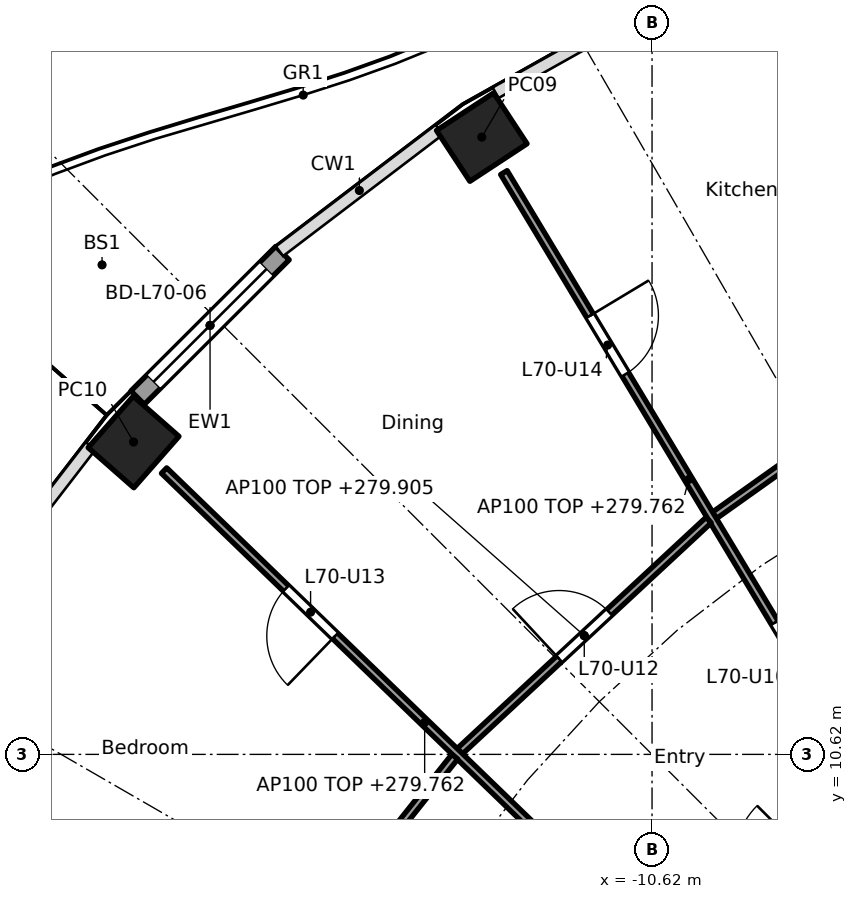
"""IFC4 building model, lengths in metres.
Left out: names, types, materials, properties, quantities, classifications, styles, units other than length and angle.
Written with IfcOpenShell. Run it as: python <this file> out.ifc"""

import sys

from ifc_helpers import new_model, si_unit, direction, frame, frame_2d, origin, origin_2d, place, context, subcontext, project, spatial, rectangle, hollow_rectangle, extrude, element, fill, save


model = new_model("IFC4")
c1 = context("Model", 3, precision=1e-05, world=origin(), true_north=direction((0.0, 1.0)))
c2 = subcontext(c1, "Body", "Model", "MODEL_VIEW")
j1 = project(units=[si_unit("LENGTHUNIT", "METRE"), si_unit("PLANEANGLEUNIT", "RADIAN")], contexts=[c1])
p1 = place(None, origin())
s1 = spatial("IfcSite", under=j1, at=p1, CompositionType="ELEMENT")
p2 = place(p1, origin())
s2 = spatial("IfcBuilding", under=s1, at=p2, CompositionType="ELEMENT")
p3 = place(p2, frame((0.0, 0.0, 277.0)))
s3 = spatial("IfcBuildingStorey", under=s2, at=p3, CompositionType="ELEMENT", Elevation=277.0)
for number, where, z_axis, x_axis in (
    (1, (-12.86, 18.741, 0.0), (0.0, 0.0, 1.0), (-0.836, -0.549, 0.0)),
    (2, (-17.441, 14.73, 0.0), (0.0, 0.0, 1.0), (-0.66, -0.751, 0.0)),
):
    element("IfcColumn", number, at=place(p3, frame(where, z_axis=z_axis, x_axis=x_axis)), inside=s3, PredefinedType="COLUMN", context=c2, shape_type="SweptSolid", body=[
        extrude(hollow_rectangle(XDim=0.9, YDim=0.8, WallThickness=0.028, at=origin_2d()), origin(), (0.0, 0.0, 1.0), 3.7),
    ])
p4 = place(p3, frame((-17.388, 15.313, 0.0), z_axis=(0.0, 0.0, 1.0), x_axis=(0.707831739508, 0.706381078841, 0.0)))
e3 = element("IfcWall", 3, at=p4, inside=s3, PredefinedType="SOLIDWALL", context=c2, shape_type="SweptSolid", body=[
    extrude(rectangle(XDim=2.693, YDim=0.25, at=frame_2d((1.346, 0.0))), origin(), (0.0, 0.0, 1.0), 3.44),
])
p5 = place(p4, frame((0.296, 0.0, 0.0)))
e4 = element("IfcOpeningElement", 4, at=p5, cuts=e3, PredefinedType="OPENING", context=c2, shape_type="SweptSolid", body=[
    extrude(rectangle(XDim=2.1, YDim=2.4, at=frame_2d((1.05, 1.2))), frame((0.0, 0.135, 0.0), z_axis=(0.0, -1.0, 0.0), x_axis=(1.0, 0.0, 0.0)), (0.0, 0.0, 1.0), 0.27),
])
p6 = place(p3, frame((-4.613, 9.988, 0.0), z_axis=(0.0, 0.0, 1.0), x_axis=(-0.707106781187, -0.707106781187, 0.0)))
e5 = element("IfcWall", 5, at=p6, inside=s3, PredefinedType="SHEAR", context=c2, shape_type="SweptSolid", body=[
    extrude(rectangle(XDim=7.602, YDim=0.6, at=frame_2d((3.801, 0.0))), origin(), (0.0, 0.0, 1.0), 3.44),
])
p7 = place(p6, frame((0.351, 0.0, 0.0)))
e6 = element("IfcOpeningElement", 6, at=p7, cuts=e5, PredefinedType="OPENING", context=c2, shape_type="SweptSolid", body=[
    extrude(rectangle(XDim=1.1, YDim=2.1, at=frame_2d((0.55, 1.05))), frame((0.0, 0.31, 0.0), z_axis=(0.0, -1.0, 0.0), x_axis=(1.0, 0.0, 0.0)), (0.0, 0.0, 1.0), 0.62),
])
p8 = place(p3, frame((-5.275, 12.494, 0.0), z_axis=(0.0, 0.0, 1.0), x_axis=(-0.707106781187, -0.707106781187, 0.0)))
e7 = element("IfcWall", 7, at=p8, inside=s3, PredefinedType="PARTITIONING", context=c2, shape_type="SweptSolid", body=[
    extrude(rectangle(XDim=10.209, YDim=0.2, at=frame_2d((5.104, 0.0))), origin(), (0.0, 0.0, 1.0), 3.44),
])
p9 = place(p8, frame((4.604, 0.0, 0.0)))
e8 = element("IfcOpeningElement", 8, at=p9, cuts=e7, PredefinedType="OPENING", context=c2, shape_type="SweptSolid", body=[
    extrude(rectangle(XDim=1.0, YDim=2.1, at=frame_2d((0.5, 1.05))), frame((0.0, 0.11, 0.0), z_axis=(0.0, -1.0, 0.0), x_axis=(1.0, 0.0, 0.0)), (0.0, 0.0, 1.0), 0.22),
])
p10 = place(p3, frame((-6.508, 16.103, 0.0), z_axis=(0.0, 0.0, 1.0), x_axis=(-0.815202203556, -0.579176456114, 0.0)))
e9 = element("IfcWall", 9, at=p10, inside=s3, PredefinedType="PARTITIONING", context=c2, shape_type="SweptSolid", body=[
    extrude(rectangle(XDim=4.036, YDim=0.1, at=frame_2d((2.018, 0.0))), origin(), (0.0, 0.0, 1.0), 2.905),
])
p11 = place(p3, frame((-7.709, 10.197, 0.0), z_axis=(0.0, 0.0, 1.0), x_axis=(-0.515516160663, 0.856879856278, 0.0)))
e10 = element("IfcWall", 10, at=p11, inside=s3, PredefinedType="PARTITIONING", context=c2, shape_type="SweptSolid", body=[
    extrude(rectangle(XDim=9.426, YDim=0.1, at=frame_2d((4.713, 0.0))), origin(), (0.0, 0.0, 1.0), 2.762),
])
p12 = place(p11, frame((1.615, 0.0, 0.0)))
e11 = element("IfcOpeningElement", 11, at=p12, cuts=e10, PredefinedType="OPENING", context=c2, shape_type="SweptSolid", body=[
    extrude(rectangle(XDim=0.9, YDim=2.1, at=frame_2d((0.45, 1.05))), frame((0.0, 0.06, 0.0), z_axis=(0.0, -1.0, 0.0), x_axis=(1.0, 0.0, 0.0)), (0.0, 0.0, 1.0), 0.12),
])
p13 = place(p11, frame((6.328, 0.0, 0.0)))
e12 = element("IfcOpeningElement", 12, at=p13, cuts=e10, PredefinedType="OPENING", context=c2, shape_type="SweptSolid", body=[
    extrude(rectangle(XDim=0.9, YDim=2.1, at=frame_2d((0.45, 1.05))), frame((0.0, 0.06, 0.0), z_axis=(0.0, -1.0, 0.0), x_axis=(1.0, 0.0, 0.0)), (0.0, 0.0, 1.0), 0.12),
])
p14 = place(p3, frame((-9.875, 13.702, 0.0), z_axis=(0.0, 0.0, 1.0), x_axis=(-0.732618266441, -0.680639754699, 0.0)))
e13 = element("IfcWall", 13, at=p14, inside=s3, PredefinedType="PARTITIONING", context=c2, shape_type="SweptSolid", body=[
    extrude(rectangle(XDim=4.467, YDim=0.1, at=frame_2d((2.233, 0.0))), origin(), (0.0, 0.0, 1.0), 2.905),
])
p15 = place(p14, frame((1.783, 0.0, 0.0)))
e14 = element("IfcOpeningElement", 14, at=p15, cuts=e13, PredefinedType="OPENING", context=c2, shape_type="SweptSolid", body=[
    extrude(rectangle(XDim=0.9, YDim=2.1, at=frame_2d((0.45, 1.05))), frame((0.0, 0.06, 0.0), z_axis=(0.0, -1.0, 0.0), x_axis=(1.0, 0.0, 0.0)), (0.0, 0.0, 1.0), 0.12),
])
p16 = place(p3, frame((-10.183, 7.727, 0.0), z_axis=(0.0, 0.0, 1.0), x_axis=(-0.719063433856, 0.694944442449, 0.0)))
e15 = element("IfcWall", 15, at=p16, inside=s3, PredefinedType="PARTITIONING", context=c2, shape_type="SweptSolid", body=[
    extrude(rectangle(XDim=9.535, YDim=0.1, at=frame_2d((4.768, 0.0))), origin(), (0.0, 0.0, 1.0), 2.762),
])
p17 = place(p16, frame((1.637, 0.0, 0.0)))
e16 = element("IfcOpeningElement", 16, at=p17, cuts=e15, PredefinedType="OPENING", context=c2, shape_type="SweptSolid", body=[
    extrude(rectangle(XDim=0.9, YDim=2.1, at=frame_2d((0.45, 1.05))), frame((0.0, 0.06, 0.0), z_axis=(0.0, -1.0, 0.0), x_axis=(1.0, 0.0, 0.0)), (0.0, 0.0, 1.0), 0.12),
])
p18 = place(p16, frame((6.405, 0.0, 0.0)))
e17 = element("IfcOpeningElement", 17, at=p18, cuts=e15, PredefinedType="OPENING", context=c2, shape_type="SweptSolid", body=[
    extrude(rectangle(XDim=0.9, YDim=2.1, at=frame_2d((0.45, 1.05))), frame((0.0, 0.06, 0.0), z_axis=(0.0, -1.0, 0.0), x_axis=(1.0, 0.0, 0.0)), (0.0, 0.0, 1.0), 0.12),
])
p19 = place(p3, frame((-13.216, 10.589, 0.0), z_axis=(0.0, 0.0, 1.0), x_axis=(-0.622251572882, -0.782817335045, 0.0)))
e18 = element("IfcWall", 18, at=p19, inside=s3, PredefinedType="PARTITIONING", context=c2, shape_type="SweptSolid", body=[
    extrude(rectangle(XDim=4.636, YDim=0.1, at=frame_2d((2.318, 0.0))), origin(), (0.0, 0.0, 1.0), 2.905),
])
p20 = place(p5, origin())
e19 = element("IfcDoor", 19, at=p20, inside=s3, OperationType="SLIDING_TO_LEFT", PredefinedType="DOOR", context=c2, shape_type="SweptSolid", body=[
    extrude(rectangle(XDim=2.1, YDim=2.4, at=frame_2d((1.05, 1.2))), frame((0.0, 0.025, 0.0), z_axis=(0.0, -1.0, 0.0), x_axis=(1.0, 0.0, 0.0)), (0.0, 0.0, 1.0), 0.05),
])
fill(e4, e19)
p21 = place(p12, frame((0.9, 0.0, 0.0), x_axis=(-1.0, 0.0, 0.0)))
e20 = element("IfcDoor", 20, at=p21, inside=s3, OperationType="SINGLE_SWING_LEFT", PredefinedType="DOOR", context=c2, shape_type="SweptSolid", body=[
    extrude(rectangle(XDim=0.9, YDim=2.1, at=frame_2d((0.45, 1.05))), frame((0.0, 0.025, 0.0), z_axis=(0.0, -1.0, 0.0), x_axis=(1.0, 0.0, 0.0)), (0.0, 0.0, 1.0), 0.05),
])
fill(e11, e20)
p22 = place(p15, frame((0.9, 0.0, 0.0), x_axis=(-1.0, 0.0, 0.0)))
e21 = element("IfcDoor", 21, at=p22, inside=s3, OperationType="SINGLE_SWING_LEFT", PredefinedType="DOOR", context=c2, shape_type="SweptSolid", body=[
    extrude(rectangle(XDim=0.9, YDim=2.1, at=frame_2d((0.45, 1.05))), frame((0.0, 0.025, 0.0), z_axis=(0.0, -1.0, 0.0), x_axis=(1.0, 0.0, 0.0)), (0.0, 0.0, 1.0), 0.05),
])
fill(e14, e21)
p23 = place(p18, origin())
e22 = element("IfcDoor", 22, at=p23, inside=s3, OperationType="SINGLE_SWING_LEFT", PredefinedType="DOOR", context=c2, shape_type="SweptSolid", body=[
    extrude(rectangle(XDim=0.9, YDim=2.1, at=frame_2d((0.45, 1.05))), frame((0.0, 0.025, 0.0), z_axis=(0.0, -1.0, 0.0), x_axis=(1.0, 0.0, 0.0)), (0.0, 0.0, 1.0), 0.05),
])
fill(e17, e22)
p24 = place(p13, frame((0.9, 0.0, 0.0), x_axis=(-1.0, 0.0, 0.0)))
e23 = element("IfcDoor", 23, at=p24, inside=s3, OperationType="SINGLE_SWING_LEFT", PredefinedType="DOOR", context=c2, shape_type="SweptSolid", body=[
    extrude(rectangle(XDim=0.9, YDim=2.1, at=frame_2d((0.45, 1.05))), frame((0.0, 0.025, 0.0), z_axis=(0.0, -1.0, 0.0), x_axis=(1.0, 0.0, 0.0)), (0.0, 0.0, 1.0), 0.05),
])
fill(e12, e23)
save(model, sys.argv[1])
